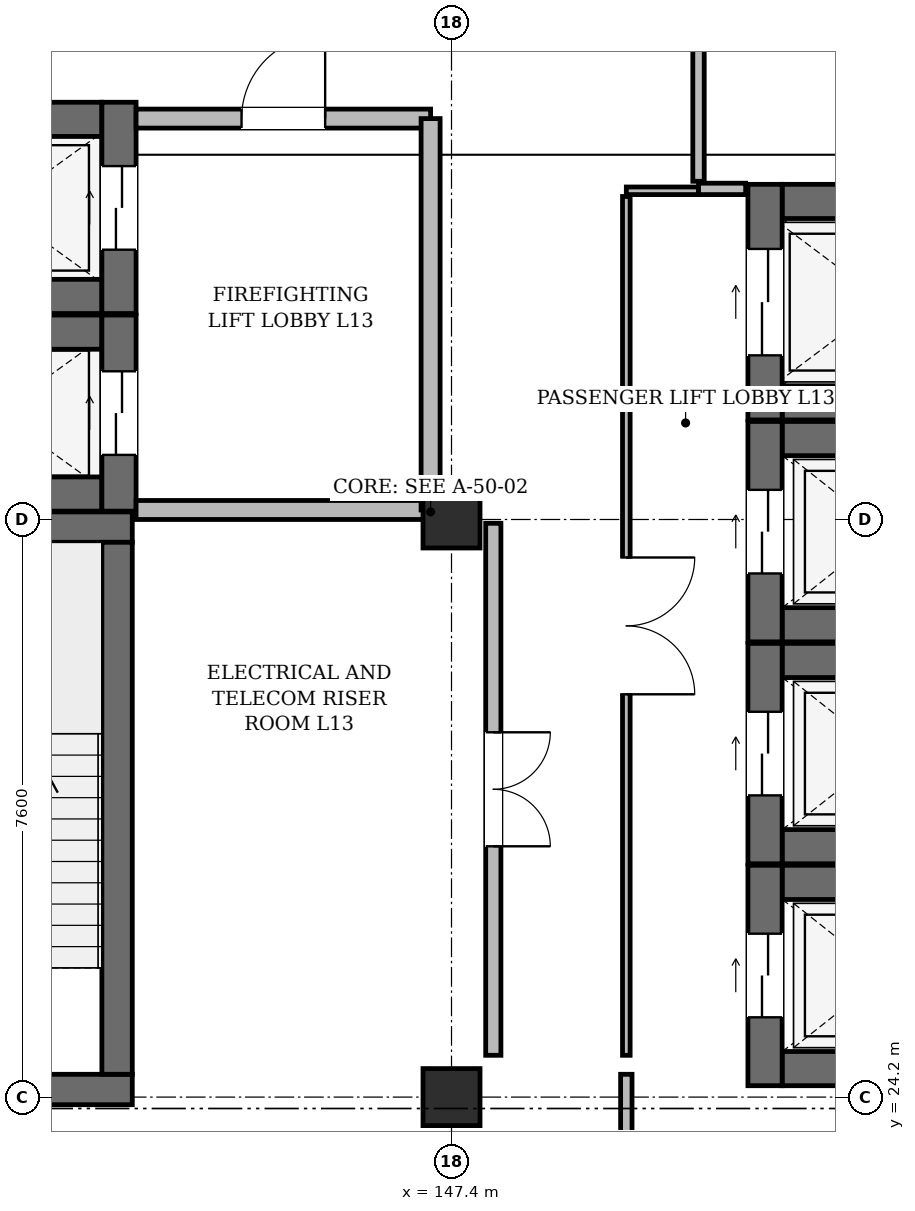
"""IFC4 building model, lengths in metres.
Left out: names, types, materials, properties, quantities, classifications, styles, units other than length and angle.
Written with IfcOpenShell. Run it as: python <this file> out.ifc"""

import sys

from ifc_helpers import new_model, si_unit, direction, frame, frame_2d, origin, origin_2d, place, context, subcontext, project, spatial, rectangle, extrude, element, fill, save


model = new_model("IFC4")
c1 = context("Model", 3, precision=1e-05, world=origin(), true_north=direction((0.0, 1.0)))
c2 = subcontext(c1, "Body", "Model", "MODEL_VIEW")
j1 = project(units=[si_unit("LENGTHUNIT", "METRE"), si_unit("PLANEANGLEUNIT", "RADIAN")], contexts=[c1])
p1 = place(None, origin())
s1 = spatial("IfcSite", under=j1, at=p1, CompositionType="ELEMENT")
p2 = place(p1, origin())
s2 = spatial("IfcBuilding", under=s1, at=p2, CompositionType="ELEMENT")
p3 = place(p2, frame((0.0, 0.0, 57.6)))
s3 = spatial("IfcBuildingStorey", under=s2, at=p3, CompositionType="ELEMENT", Elevation=57.6)
for number, where, z_axis, x_axis in (
    (1, (147.4, 24.2, 0.0), (0.0, 0.0, 1.0), (1.0, 0.0, 0.0)),
    (2, (147.4, 31.8, 0.0), (0.0, 0.0, 1.0), (1.0, 0.0, 0.0)),
):
    element("IfcColumn", number, at=place(p3, frame(where, z_axis=z_axis, x_axis=x_axis)), inside=s3, PredefinedType="COLUMN", context=c2, shape_type="SweptSolid", body=[
        extrude(rectangle(XDim=0.75, YDim=0.75, at=origin_2d()), origin(), (0.0, 0.0, 1.0), 3.92),
    ])
p4 = place(p3, frame((139.4, 24.3, 0.0), z_axis=(0.0, 0.0, 1.0), x_axis=(1.0, 0.0, 0.0)))
e3 = element("IfcWall", 3, at=p4, inside=s3, PredefinedType="SHEAR", context=c2, shape_type="SweptSolid", body=[
    extrude(rectangle(XDim=3.8, YDim=0.4, at=frame_2d((1.9, 0.0))), origin(), (0.0, 0.0, 1.0), 3.92),
])
p5 = place(p4, frame((1.3, 0.0, 0.0)))
e4 = element("IfcOpeningElement", 4, at=p5, cuts=e3, PredefinedType="OPENING", context=c2, shape_type="SweptSolid", body=[
    extrude(rectangle(XDim=1.2, YDim=2.2, at=frame_2d((0.6, 1.1))), frame((0.0, 0.212, 0.0), z_axis=(0.0, -1.0, 0.0), x_axis=(1.0, 0.0, 0.0)), (0.0, 0.0, 1.0), 0.424),
])
p6 = place(p3, frame((139.4, 31.7, 0.0), z_axis=(0.0, 0.0, 1.0), x_axis=(1.0, 0.0, 0.0)))
e5 = element("IfcWall", 5, at=p6, inside=s3, PredefinedType="SHEAR", context=c2, shape_type="SweptSolid", body=[
    extrude(rectangle(XDim=3.8, YDim=0.4, at=frame_2d((1.9, 0.0))), origin(), (0.0, 0.0, 1.0), 3.92),
])
p7 = place(p3, frame((143.0, 24.5, 0.0), z_axis=(0.0, 0.0, 1.0), x_axis=(0.0, 1.0, 0.0)))
e6 = element("IfcWall", 6, at=p7, inside=s3, PredefinedType="SHEAR", context=c2, shape_type="SweptSolid", body=[
    extrude(rectangle(XDim=7.0, YDim=0.4, at=frame_2d((3.5, 0.0))), origin(), (0.0, 0.0, 1.0), 3.92),
])
for number, where, z_axis, x_axis in (
    (7, (140.06, 32.135, 0.0), (0.0, 0.0, 1.0), (1.0, 0.0, 0.0)),
    (8, (140.06, 34.265, 0.0), (0.0, 0.0, 1.0), (1.0, 0.0, 0.0)),
):
    element("IfcWall", number, at=place(p3, frame(where, z_axis=z_axis, x_axis=x_axis)), inside=s3, PredefinedType="SHEAR", context=c2, shape_type="SweptSolid", body=[
        extrude(rectangle(XDim=2.74, YDim=0.45, at=frame_2d((1.37, 0.0))), origin(), (0.0, 0.0, 1.0), 3.92),
    ])
p8 = place(p3, frame((143.025, 31.91, 0.0), z_axis=(0.0, 0.0, 1.0), x_axis=(0.0, 1.0, 0.0)))
e9 = element("IfcWall", 9, at=p8, inside=s3, PredefinedType="SHEAR", context=c2, shape_type="SweptSolid", body=[
    extrude(rectangle(XDim=2.58, YDim=0.45, at=frame_2d((1.29, 0.0))), origin(), (0.0, 0.0, 1.0), 3.92),
])
p9 = place(p8, frame((0.74, 0.0, 0.0)))
e10 = element("IfcOpeningElement", 10, at=p9, cuts=e9, PredefinedType="OPENING", context=c2, shape_type="SweptSolid", body=[
    extrude(rectangle(XDim=1.1, YDim=2.2, at=frame_2d((0.55, 1.1))), frame((0.0, 0.237, 0.0), z_axis=(0.0, -1.0, 0.0), x_axis=(1.0, 0.0, 0.0)), (0.0, 0.0, 1.0), 0.474),
])
for number, where, z_axis, x_axis in (
    (11, (140.06, 34.735, 0.0), (0.0, 0.0, 1.0), (1.0, 0.0, 0.0)),
    (12, (140.06, 37.065, 0.0), (0.0, 0.0, 1.0), (1.0, 0.0, 0.0)),
):
    element("IfcWall", number, at=place(p3, frame(where, z_axis=z_axis, x_axis=x_axis)), inside=s3, PredefinedType="SHEAR", context=c2, shape_type="SweptSolid", body=[
        extrude(rectangle(XDim=2.74, YDim=0.45, at=frame_2d((1.37, 0.0))), origin(), (0.0, 0.0, 1.0), 3.92),
    ])
p10 = place(p3, frame((143.025, 34.51, 0.0), z_axis=(0.0, 0.0, 1.0), x_axis=(0.0, 1.0, 0.0)))
e13 = element("IfcWall", 13, at=p10, inside=s3, PredefinedType="SHEAR", context=c2, shape_type="SweptSolid", body=[
    extrude(rectangle(XDim=2.78, YDim=0.45, at=frame_2d((1.39, 0.0))), origin(), (0.0, 0.0, 1.0), 3.92),
])
p11 = place(p10, frame((0.84, 0.0, 0.0)))
e14 = element("IfcOpeningElement", 14, at=p11, cuts=e13, PredefinedType="OPENING", context=c2, shape_type="SweptSolid", body=[
    extrude(rectangle(XDim=1.1, YDim=2.2, at=frame_2d((0.55, 1.1))), frame((0.0, 0.237, 0.0), z_axis=(0.0, -1.0, 0.0), x_axis=(1.0, 0.0, 0.0)), (0.0, 0.0, 1.0), 0.474),
])
for number, where, z_axis, x_axis in (
    (15, (151.75, 24.575, 0.0), (0.0, 0.0, 1.0), (1.0, 0.0, 0.0)),
    (16, (151.75, 27.025, 0.0), (0.0, 0.0, 1.0), (1.0, 0.0, 0.0)),
):
    element("IfcWall", number, at=place(p3, frame(where, z_axis=z_axis, x_axis=x_axis)), inside=s3, PredefinedType="SHEAR", context=c2, shape_type="SweptSolid", body=[
        extrude(rectangle(XDim=2.7, YDim=0.45, at=frame_2d((1.35, 0.0))), origin(), (0.0, 0.0, 1.0), 3.92),
    ])
p12 = place(p3, frame((151.525, 24.35, 0.0), z_axis=(0.0, 0.0, 1.0), x_axis=(0.0, 1.0, 0.0)))
e17 = element("IfcWall", 17, at=p12, inside=s3, PredefinedType="SHEAR", context=c2, shape_type="SweptSolid", body=[
    extrude(rectangle(XDim=2.9, YDim=0.45, at=frame_2d((1.45, 0.0))), origin(), (0.0, 0.0, 1.0), 3.92),
])
p13 = place(p12, frame((0.9, 0.0, 0.0)))
e18 = element("IfcOpeningElement", 18, at=p13, cuts=e17, PredefinedType="OPENING", context=c2, shape_type="SweptSolid", body=[
    extrude(rectangle(XDim=1.1, YDim=2.2, at=frame_2d((0.55, 1.1))), frame((0.0, 0.237, 0.0), z_axis=(0.0, -1.0, 0.0), x_axis=(1.0, 0.0, 0.0)), (0.0, 0.0, 1.0), 0.474),
])
for number, where, z_axis, x_axis in (
    (19, (151.75, 27.495, 0.0), (0.0, 0.0, 1.0), (1.0, 0.0, 0.0)),
    (20, (151.75, 29.945, 0.0), (0.0, 0.0, 1.0), (1.0, 0.0, 0.0)),
):
    element("IfcWall", number, at=place(p3, frame(where, z_axis=z_axis, x_axis=x_axis)), inside=s3, PredefinedType="SHEAR", context=c2, shape_type="SweptSolid", body=[
        extrude(rectangle(XDim=2.7, YDim=0.45, at=frame_2d((1.35, 0.0))), origin(), (0.0, 0.0, 1.0), 3.92),
    ])
p14 = place(p3, frame((151.525, 27.27, 0.0), z_axis=(0.0, 0.0, 1.0), x_axis=(0.0, 1.0, 0.0)))
e21 = element("IfcWall", 21, at=p14, inside=s3, PredefinedType="SHEAR", context=c2, shape_type="SweptSolid", body=[
    extrude(rectangle(XDim=2.9, YDim=0.45, at=frame_2d((1.45, 0.0))), origin(), (0.0, 0.0, 1.0), 3.92),
])
p15 = place(p14, frame((0.9, 0.0, 0.0)))
e22 = element("IfcOpeningElement", 22, at=p15, cuts=e21, PredefinedType="OPENING", context=c2, shape_type="SweptSolid", body=[
    extrude(rectangle(XDim=1.1, YDim=2.2, at=frame_2d((0.55, 1.1))), frame((0.0, 0.237, 0.0), z_axis=(0.0, -1.0, 0.0), x_axis=(1.0, 0.0, 0.0)), (0.0, 0.0, 1.0), 0.474),
])
for number, where, z_axis, x_axis in (
    (23, (151.75, 30.415, 0.0), (0.0, 0.0, 1.0), (1.0, 0.0, 0.0)),
    (24, (151.75, 32.865, 0.0), (0.0, 0.0, 1.0), (1.0, 0.0, 0.0)),
):
    element("IfcWall", number, at=place(p3, frame(where, z_axis=z_axis, x_axis=x_axis)), inside=s3, PredefinedType="SHEAR", context=c2, shape_type="SweptSolid", body=[
        extrude(rectangle(XDim=2.7, YDim=0.45, at=frame_2d((1.35, 0.0))), origin(), (0.0, 0.0, 1.0), 3.92),
    ])
p16 = place(p3, frame((151.525, 30.19, 0.0), z_axis=(0.0, 0.0, 1.0), x_axis=(0.0, 1.0, 0.0)))
e25 = element("IfcWall", 25, at=p16, inside=s3, PredefinedType="SHEAR", context=c2, shape_type="SweptSolid", body=[
    extrude(rectangle(XDim=2.9, YDim=0.45, at=frame_2d((1.45, 0.0))), origin(), (0.0, 0.0, 1.0), 3.92),
])
p17 = place(p16, frame((0.9, 0.0, 0.0)))
e26 = element("IfcOpeningElement", 26, at=p17, cuts=e25, PredefinedType="OPENING", context=c2, shape_type="SweptSolid", body=[
    extrude(rectangle(XDim=1.1, YDim=2.2, at=frame_2d((0.55, 1.1))), frame((0.0, 0.237, 0.0), z_axis=(0.0, -1.0, 0.0), x_axis=(1.0, 0.0, 0.0)), (0.0, 0.0, 1.0), 0.474),
])
for number, where, z_axis, x_axis in (
    (27, (151.75, 33.335, 0.0), (0.0, 0.0, 1.0), (1.0, 0.0, 0.0)),
    (28, (151.75, 35.985, 0.0), (0.0, 0.0, 1.0), (1.0, 0.0, 0.0)),
):
    element("IfcWall", number, at=place(p3, frame(where, z_axis=z_axis, x_axis=x_axis)), inside=s3, PredefinedType="SHEAR", context=c2, shape_type="SweptSolid", body=[
        extrude(rectangle(XDim=2.7, YDim=0.45, at=frame_2d((1.35, 0.0))), origin(), (0.0, 0.0, 1.0), 3.92),
    ])
p18 = place(p3, frame((151.525, 33.11, 0.0), z_axis=(0.0, 0.0, 1.0), x_axis=(0.0, 1.0, 0.0)))
e29 = element("IfcWall", 29, at=p18, inside=s3, PredefinedType="SHEAR", context=c2, shape_type="SweptSolid", body=[
    extrude(rectangle(XDim=3.1, YDim=0.45, at=frame_2d((1.55, 0.0))), origin(), (0.0, 0.0, 1.0), 3.92),
])
p19 = place(p18, frame((0.85, 0.0, 0.0)))
e30 = element("IfcOpeningElement", 30, at=p19, cuts=e29, PredefinedType="OPENING", context=c2, shape_type="SweptSolid", body=[
    extrude(rectangle(XDim=1.4, YDim=2.3, at=frame_2d((0.7, 1.15))), frame((0.0, 0.237, 0.0), z_axis=(0.0, -1.0, 0.0), x_axis=(1.0, 0.0, 0.0)), (0.0, 0.0, 1.0), 0.474),
])
p20 = place(p3, frame((143.25, 37.075, 0.0), z_axis=(0.0, 0.0, 1.0), x_axis=(1.0, 0.0, 0.0)))
e31 = element("IfcWall", 31, at=p20, inside=s3, PredefinedType="SOLIDWALL", context=c2, shape_type="SweptSolid", body=[
    extrude(rectangle(XDim=3.875, YDim=0.25, at=frame_2d((1.938, 0.0))), origin(), (0.0, 0.0, 1.0), 3.805),
])
p21 = place(p20, frame((1.387, 0.0, 0.0)))
e32 = element("IfcOpeningElement", 32, at=p21, cuts=e31, PredefinedType="OPENING", context=c2, shape_type="SweptSolid", body=[
    extrude(rectangle(XDim=1.1, YDim=2.2, at=frame_2d((0.55, 1.1))), frame((0.0, 0.137, 0.0), z_axis=(0.0, -1.0, 0.0), x_axis=(1.0, 0.0, 0.0)), (0.0, 0.0, 1.0), 0.274),
])
p22 = place(p3, frame((143.25, 31.925, 0.0), z_axis=(0.0, 0.0, 1.0), x_axis=(1.0, 0.0, 0.0)))
e33 = element("IfcWall", 33, at=p22, inside=s3, PredefinedType="SOLIDWALL", context=c2, shape_type="SweptSolid", body=[
    extrude(rectangle(XDim=3.875, YDim=0.25, at=frame_2d((1.938, 0.0))), origin(), (0.0, 0.0, 1.0), 3.255),
])
p23 = place(p3, frame((147.125, 31.925, 0.0), z_axis=(0.0, 0.0, 1.0), x_axis=(0.0, 1.0, 0.0)))
e34 = element("IfcWall", 34, at=p23, inside=s3, PredefinedType="SOLIDWALL", context=c2, shape_type="SweptSolid", body=[
    extrude(rectangle(XDim=5.15, YDim=0.25, at=frame_2d((2.575, 0.0))), origin(), (0.0, 0.0, 1.0), 3.255),
])
p24 = place(p3, frame((147.95, 31.75, 0.0), z_axis=(0.0, 0.0, 1.0), x_axis=(0.0, -1.0, 0.0)))
e35 = element("IfcWall", 35, at=p24, inside=s3, PredefinedType="PARTITIONING", context=c2, shape_type="SweptSolid", body=[
    extrude(rectangle(XDim=7.0, YDim=0.2, at=frame_2d((3.5, 0.0))), origin(), (0.0, 0.0, 1.0), 3.805),
])
p25 = place(p24, frame((2.75, 0.0, 0.0)))
e36 = element("IfcOpeningElement", 36, at=p25, cuts=e35, PredefinedType="OPENING", context=c2, shape_type="SweptSolid", body=[
    extrude(rectangle(XDim=1.5, YDim=2.2, at=frame_2d((0.75, 1.1))), frame((0.0, 0.112, 0.0), z_axis=(0.0, -1.0, 0.0), x_axis=(1.0, 0.0, 0.0)), (0.0, 0.0, 1.0), 0.224),
])
p26 = place(p3, frame((149.7, 24.75, 0.0), z_axis=(0.0, 0.0, 1.0), x_axis=(0.0, 1.0, 0.0)))
e37 = element("IfcWall", 37, at=p26, inside=s3, PredefinedType="PARTITIONING", context=c2, shape_type="SweptSolid", body=[
    extrude(rectangle(XDim=11.3, YDim=0.1, at=frame_2d((5.65, 0.0))), origin(), (0.0, 0.0, 1.0), 3.805),
])
p27 = place(p26, frame((4.75, 0.0, 0.0)))
e38 = element("IfcOpeningElement", 38, at=p27, cuts=e37, PredefinedType="OPENING", context=c2, shape_type="SweptSolid", body=[
    extrude(rectangle(XDim=1.8, YDim=2.4, at=frame_2d((0.9, 1.2))), frame((0.0, 0.062, 0.0), z_axis=(0.0, -1.0, 0.0), x_axis=(1.0, 0.0, 0.0)), (0.0, 0.0, 1.0), 0.124),
])
p28 = place(p3, frame((149.7, 36.125, 0.0), z_axis=(0.0, 0.0, 1.0), x_axis=(1.0, 0.0, 0.0)))
e39 = element("IfcWall", 39, at=p28, inside=s3, PredefinedType="PARTITIONING", context=c2, shape_type="SweptSolid", body=[
    extrude(rectangle(XDim=0.95, YDim=0.1, at=frame_2d((0.475, 0.0))), origin(), (0.0, 0.0, 1.0), 3.805),
])
p29 = place(p3, frame((150.65, 36.15, 0.0), z_axis=(0.0, 0.0, 1.0), x_axis=(1.0, 0.0, 0.0)))
e40 = element("IfcWall", 40, at=p29, inside=s3, PredefinedType="PARTITIONING", context=c2, shape_type="SweptSolid", body=[
    extrude(rectangle(XDim=0.62, YDim=0.15, at=frame_2d((0.31, 0.0))), origin(), (0.0, 0.0, 1.0), 3.805),
])
p30 = place(p3, frame((149.7, 24.5, 0.0), z_axis=(0.0, 0.0, 1.0), x_axis=(0.0, -1.0, 0.0)))
e41 = element("IfcWall", 41, at=p30, inside=s3, PredefinedType="PARTITIONING", context=c2, shape_type="SweptSolid", body=[
    extrude(rectangle(XDim=0.8, YDim=0.15, at=frame_2d((0.4, 0.0))), origin(), (0.0, 0.0, 1.0), 3.805),
])
p31 = place(p3, frame((150.65, 47.0, 0.0), z_axis=(0.0, 0.0, 1.0), x_axis=(0.0, -1.0, 0.0)))
e42 = element("IfcWall", 42, at=p31, inside=s3, PredefinedType="PARTITIONING", context=c2, shape_type="SweptSolid", body=[
    extrude(rectangle(XDim=10.75, YDim=0.15, at=frame_2d((5.375, 0.0))), origin(), (0.0, 0.0, 1.0), 3.805),
])
p32 = place(p31, frame((4.675, 0.0, 0.0)))
e43 = element("IfcOpeningElement", 43, at=p32, cuts=e42, PredefinedType="OPENING", context=c2, shape_type="SweptSolid", body=[
    extrude(rectangle(XDim=1.4, YDim=2.2, at=frame_2d((0.7, 1.1))), frame((0.0, 0.087, 0.0), z_axis=(0.0, -1.0, 0.0), x_axis=(1.0, 0.0, 0.0)), (0.0, 0.0, 1.0), 0.174),
])
p33 = place(p9, origin())
e44 = element("IfcDoor", 44, at=p33, inside=s3, OperationType="DOUBLE_DOOR_SLIDING", PredefinedType="DOOR", context=c2, shape_type="SweptSolid", body=[
    extrude(rectangle(XDim=1.1, YDim=2.2, at=frame_2d((0.55, 1.1))), frame((0.0, 0.025, 0.0), z_axis=(0.0, -1.0, 0.0), x_axis=(1.0, 0.0, 0.0)), (0.0, 0.0, 1.0), 0.05),
])
fill(e10, e44)
p34 = place(p11, origin())
e45 = element("IfcDoor", 45, at=p34, inside=s3, OperationType="DOUBLE_DOOR_SLIDING", PredefinedType="DOOR", context=c2, shape_type="SweptSolid", body=[
    extrude(rectangle(XDim=1.1, YDim=2.2, at=frame_2d((0.55, 1.1))), frame((0.0, 0.025, 0.0), z_axis=(0.0, -1.0, 0.0), x_axis=(1.0, 0.0, 0.0)), (0.0, 0.0, 1.0), 0.05),
])
fill(e14, e45)
p35 = place(p13, origin())
e46 = element("IfcDoor", 46, at=p35, inside=s3, OperationType="DOUBLE_DOOR_SLIDING", PredefinedType="DOOR", context=c2, shape_type="SweptSolid", body=[
    extrude(rectangle(XDim=1.1, YDim=2.2, at=frame_2d((0.55, 1.1))), frame((0.0, 0.025, 0.0), z_axis=(0.0, -1.0, 0.0), x_axis=(1.0, 0.0, 0.0)), (0.0, 0.0, 1.0), 0.05),
])
fill(e18, e46)
p36 = place(p15, origin())
e47 = element("IfcDoor", 47, at=p36, inside=s3, OperationType="DOUBLE_DOOR_SLIDING", PredefinedType="DOOR", context=c2, shape_type="SweptSolid", body=[
    extrude(rectangle(XDim=1.1, YDim=2.2, at=frame_2d((0.55, 1.1))), frame((0.0, 0.025, 0.0), z_axis=(0.0, -1.0, 0.0), x_axis=(1.0, 0.0, 0.0)), (0.0, 0.0, 1.0), 0.05),
])
fill(e22, e47)
p37 = place(p17, origin())
e48 = element("IfcDoor", 48, at=p37, inside=s3, OperationType="DOUBLE_DOOR_SLIDING", PredefinedType="DOOR", context=c2, shape_type="SweptSolid", body=[
    extrude(rectangle(XDim=1.1, YDim=2.2, at=frame_2d((0.55, 1.1))), frame((0.0, 0.025, 0.0), z_axis=(0.0, -1.0, 0.0), x_axis=(1.0, 0.0, 0.0)), (0.0, 0.0, 1.0), 0.05),
])
fill(e26, e48)
p38 = place(p19, origin())
e49 = element("IfcDoor", 49, at=p38, inside=s3, OperationType="DOUBLE_DOOR_SLIDING", PredefinedType="DOOR", context=c2, shape_type="SweptSolid", body=[
    extrude(rectangle(XDim=1.4, YDim=2.3, at=frame_2d((0.7, 1.15))), frame((0.0, 0.025, 0.0), z_axis=(0.0, -1.0, 0.0), x_axis=(1.0, 0.0, 0.0)), (0.0, 0.0, 1.0), 0.05),
])
fill(e30, e49)
p39 = place(p21, origin())
e50 = element("IfcDoor", 50, at=p39, inside=s3, OperationType="SINGLE_SWING_RIGHT", PredefinedType="DOOR", context=c2, shape_type="SweptSolid", body=[
    extrude(rectangle(XDim=1.1, YDim=2.2, at=frame_2d((0.55, 1.1))), frame((0.0, 0.025, 0.0), z_axis=(0.0, -1.0, 0.0), x_axis=(1.0, 0.0, 0.0)), (0.0, 0.0, 1.0), 0.05),
])
fill(e32, e50)
p40 = place(p25, origin())
e51 = element("IfcDoor", 51, at=p40, inside=s3, OperationType="DOUBLE_DOOR_SINGLE_SWING", PredefinedType="DOOR", context=c2, shape_type="SweptSolid", body=[
    extrude(rectangle(XDim=1.5, YDim=2.2, at=frame_2d((0.75, 1.1))), frame((0.0, 0.025, 0.0), z_axis=(0.0, -1.0, 0.0), x_axis=(1.0, 0.0, 0.0)), (0.0, 0.0, 1.0), 0.05),
])
fill(e36, e51)
p41 = place(p27, frame((1.8, 0.0, 0.0), z_axis=(0.0, 0.0, 1.0), x_axis=(-1.0, 0.0, 0.0)))
e52 = element("IfcDoor", 52, at=p41, inside=s3, OperationType="DOUBLE_DOOR_SINGLE_SWING", PredefinedType="DOOR", context=c2, shape_type="SweptSolid", body=[
    extrude(rectangle(XDim=1.8, YDim=2.4, at=frame_2d((0.9, 1.2))), frame((0.0, 0.025, 0.0), z_axis=(0.0, -1.0, 0.0), x_axis=(1.0, 0.0, 0.0)), (0.0, 0.0, 1.0), 0.05),
])
fill(e38, e52)
save(model, sys.argv[1])
